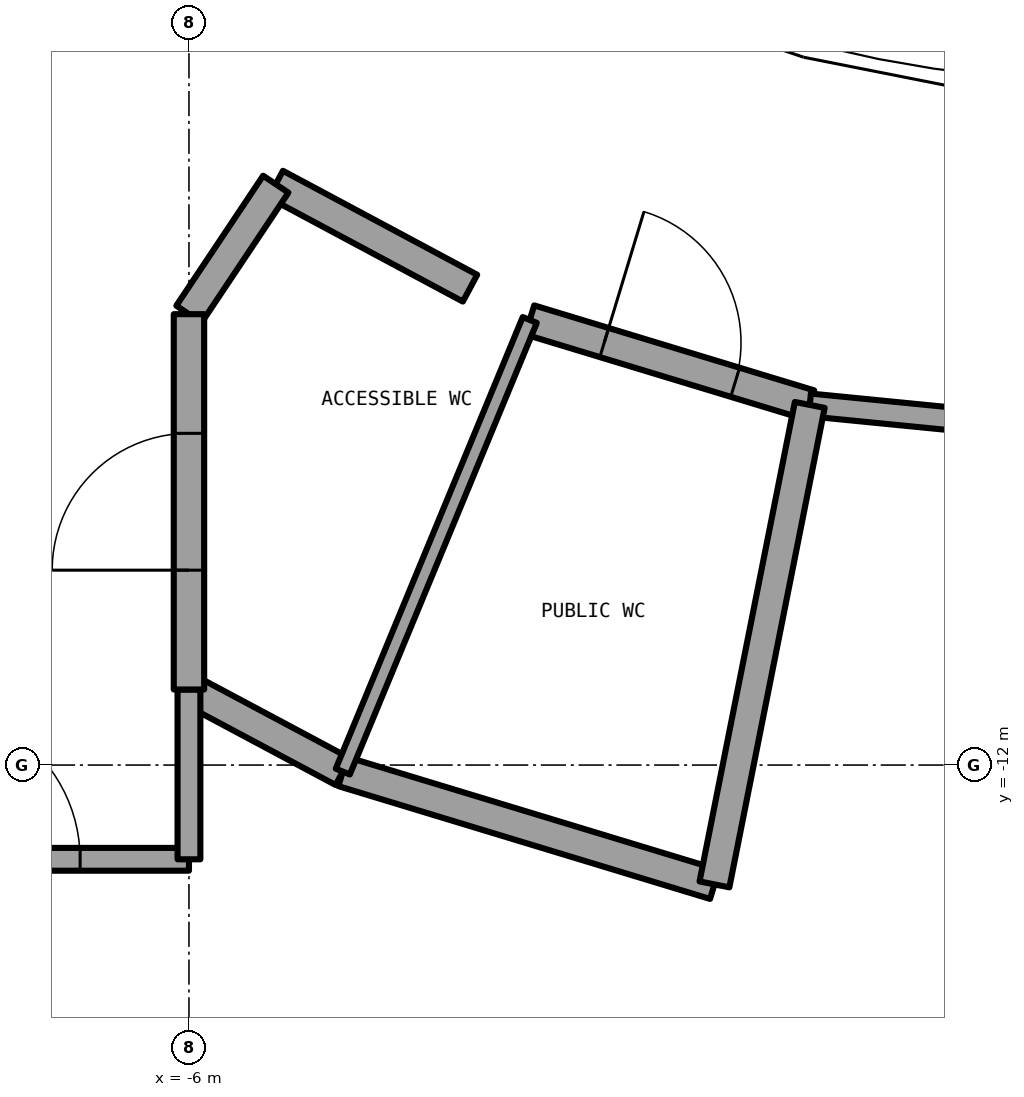
"""IFC4 building model, lengths in metres.
Left out: names, types, materials, properties, quantities, classifications, styles, units other than length and angle.
Written with IfcOpenShell. Run it as: python <this file> out.ifc"""

import sys

from ifc_helpers import new_model, si_unit, direction, frame, frame_2d, origin, place, context, subcontext, project, spatial, rectangle, extrude, element, fill, save


model = new_model("IFC4")
c1 = context("Model", 3, precision=1e-05, world=origin(), true_north=direction((0.0, 1.0)))
c2 = subcontext(c1, "Body", "Model", "MODEL_VIEW")
j1 = project(units=[si_unit("LENGTHUNIT", "METRE"), si_unit("PLANEANGLEUNIT", "RADIAN")], contexts=[c1])
p1 = place(None, origin())
s1 = spatial("IfcSite", under=j1, at=p1, CompositionType="ELEMENT")
p2 = place(p1, origin())
s2 = spatial("IfcBuilding", under=s1, at=p2, CompositionType="ELEMENT")
p3 = place(p2, frame((0.0, 0.0, 139.1)))
s3 = spatial("IfcBuildingStorey", under=s2, at=p3, CompositionType="ELEMENT", Elevation=139.1)
p4 = place(p3, frame((-6.0, -11.503, 0.0), z_axis=(0.0, 0.0, 1.0), x_axis=(0.882235076446, -0.470809165042, 0.0)))
e1 = element("IfcWall", 1, at=p4, inside=s3, PredefinedType="PARTITIONING", context=c2, shape_type="SweptSolid", body=[
    extrude(rectangle(XDim=1.147, YDim=0.2, at=frame_2d((0.573, 0.0))), origin(), (0.0, 0.0, 1.0), 5.75),
])
p5 = place(p3, frame((-4.988, -12.043, 0.0), z_axis=(0.0, 0.0, 1.0), x_axis=(0.956914242202, -0.290370682182, 0.0)))
e2 = element("IfcWall", 2, at=p5, inside=s3, PredefinedType="PARTITIONING", context=c2, shape_type="SweptSolid", body=[
    extrude(rectangle(XDim=2.555, YDim=0.2, at=frame_2d((1.278, 0.0))), origin(), (0.0, 0.0, 1.0), 5.75),
])
p6 = place(p3, frame((-8.432, -12.62, 0.0), z_axis=(0.0, 0.0, 1.0), x_axis=(1.0, 0.0, 0.0)))
e3 = element("IfcWall", 3, at=p6, inside=s3, PredefinedType="PARTITIONING", context=c2, shape_type="SweptSolid", body=[
    extrude(rectangle(XDim=2.432, YDim=0.15, at=frame_2d((1.216, 0.0))), origin(), (0.0, 0.0, 1.0), 5.75),
])
p7 = place(p6, frame((0.716, 0.0, 0.0)))
e4 = element("IfcOpeningElement", 4, at=p7, cuts=e3, PredefinedType="OPENING", context=c2, shape_type="SweptSolid", body=[
    extrude(rectangle(XDim=1.0, YDim=2.3, at=frame_2d((0.5, 1.15))), frame((0.0, 0.085, 0.0), z_axis=(0.0, -1.0, 0.0), x_axis=(1.0, 0.0, 0.0)), (0.0, 0.0, 1.0), 0.17),
])
p8 = place(p3, frame((-5.429, -8.179, 0.0), z_axis=(0.0, 0.0, 1.0), x_axis=(0.881652665802, -0.471898905364, 0.0)))
e5 = element("IfcWall", 5, at=p8, inside=s3, PredefinedType="PARTITIONING", context=c2, shape_type="SweptSolid", body=[
    extrude(rectangle(XDim=1.45, YDim=0.2, at=frame_2d((0.725, 0.0))), origin(), (0.0, 0.0, 1.0), 5.75),
])
p9 = place(p3, frame((-3.758, -9.072, 0.0), z_axis=(0.0, 0.0, 1.0), x_axis=(0.956896312675, -0.29042976223, 0.0)))
e6 = element("IfcWall", 6, at=p9, inside=s3, PredefinedType="PARTITIONING", context=c2, shape_type="SweptSolid", body=[
    extrude(rectangle(XDim=1.925, YDim=0.2, at=frame_2d((0.962, 0.0))), origin(), (0.0, 0.0, 1.0), 5.75),
])
p10 = place(p9, frame((0.512, 0.0, 0.0)))
e7 = element("IfcOpeningElement", 7, at=p10, cuts=e6, PredefinedType="OPENING", context=c2, shape_type="SweptSolid", body=[
    extrude(rectangle(XDim=0.9, YDim=2.3, at=frame_2d((0.45, 1.15))), frame((0.0, 0.11, 0.0), z_axis=(0.0, -1.0, 0.0), x_axis=(1.0, 0.0, 0.0)), (0.0, 0.0, 1.0), 0.22),
])
p11 = place(p3, frame((-1.916, -9.631, 0.0), z_axis=(0.0, 0.0, 1.0), x_axis=(0.995171860647, -0.098147683504, 0.0)))
e8 = element("IfcWall", 8, at=p11, inside=s3, PredefinedType="PARTITIONING", context=c2, shape_type="SweptSolid", body=[
    extrude(rectangle(XDim=1.925, YDim=0.15, at=frame_2d((0.963, 0.0))), origin(), (0.0, 0.0, 1.0), 5.75),
])
p12 = place(p3, frame((-6.0, -9.034, 0.0), z_axis=(0.0, 0.0, 1.0), x_axis=(0.555412364489, 0.831575075007, 0.0)))
e9 = element("IfcWall", 9, at=p12, inside=s3, PredefinedType="PARTITIONING", context=c2, shape_type="SweptSolid", body=[
    extrude(rectangle(XDim=1.028, YDim=0.2, at=frame_2d((0.514, 0.0))), origin(), (0.0, 0.0, 1.0), 5.75),
])
p13 = place(p3, frame((-4.988, -12.043, 0.0), z_axis=(0.0, 0.0, 1.0), x_axis=(0.382517205945, 0.923948368231, 0.0)))
e10 = element("IfcWall", 10, at=p13, inside=s3, PredefinedType="PARTITIONING", context=c2, shape_type="SweptSolid", body=[
    extrude(rectangle(XDim=3.216, YDim=0.1, at=frame_2d((1.608, 0.0))), origin(), (0.0, 0.0, 1.0), 5.75),
])
p14 = place(p3, frame((-2.543, -12.785, 0.0), z_axis=(0.0, 0.0, 1.0), x_axis=(0.194977117829, 0.980807791325, 0.0)))
e11 = element("IfcWall", 11, at=p14, inside=s3, PredefinedType="PARTITIONING", context=c2, shape_type="SweptSolid", body=[
    extrude(rectangle(XDim=3.216, YDim=0.2, at=frame_2d((1.608, 0.0))), origin(), (0.0, 0.0, 1.0), 5.75),
])
p15 = place(p3, frame((-6.0, -12.62, 0.0), z_axis=(0.0, 0.0, 1.0), x_axis=(0.0, 1.0, 0.0)))
e12 = element("IfcWall", 12, at=p15, inside=s3, PredefinedType="PARTITIONING", context=c2, shape_type="SweptSolid", body=[
    extrude(rectangle(XDim=1.117, YDim=0.15, at=frame_2d((0.559, 0.0))), origin(), (0.0, 0.0, 1.0), 5.75),
])
p16 = place(p3, frame((-6.0, -11.503, 0.0), z_axis=(0.0, 0.0, 1.0), x_axis=(0.0, 1.0, 0.0)))
e13 = element("IfcWall", 13, at=p16, inside=s3, PredefinedType="PARTITIONING", context=c2, shape_type="SweptSolid", body=[
    extrude(rectangle(XDim=2.469, YDim=0.2, at=frame_2d((1.234, 0.0))), origin(), (0.0, 0.0, 1.0), 5.75),
])
p17 = place(p16, frame((0.785, 0.0, 0.0)))
e14 = element("IfcOpeningElement", 14, at=p17, cuts=e13, PredefinedType="OPENING", context=c2, shape_type="SweptSolid", body=[
    extrude(rectangle(XDim=0.9, YDim=2.3, at=frame_2d((0.45, 1.15))), frame((0.0, 0.11, 0.0), z_axis=(0.0, -1.0, 0.0), x_axis=(1.0, 0.0, 0.0)), (0.0, 0.0, 1.0), 0.22),
])
p18 = place(p17, origin())
e15 = element("IfcDoor", 15, at=p18, inside=s3, OperationType="SINGLE_SWING_RIGHT", PredefinedType="DOOR", context=c2, shape_type="SweptSolid", body=[
    extrude(rectangle(XDim=0.9, YDim=2.3, at=frame_2d((0.45, 1.15))), frame((0.0, 0.025, 0.0), z_axis=(0.0, -1.0, 0.0), x_axis=(1.0, 0.0, 0.0)), (0.0, 0.0, 1.0), 0.05),
])
fill(e14, e15)
p19 = place(p10, origin())
e16 = element("IfcDoor", 16, at=p19, inside=s3, OperationType="SINGLE_SWING_RIGHT", PredefinedType="DOOR", context=c2, shape_type="SweptSolid", body=[
    extrude(rectangle(XDim=0.9, YDim=2.3, at=frame_2d((0.45, 1.15))), frame((0.0, 0.025, 0.0), z_axis=(0.0, -1.0, 0.0), x_axis=(1.0, 0.0, 0.0)), (0.0, 0.0, 1.0), 0.05),
])
fill(e7, e16)
p20 = place(p7, origin())
e17 = element("IfcDoor", 17, at=p20, inside=s3, OperationType="SINGLE_SWING_LEFT", PredefinedType="DOOR", context=c2, shape_type="SweptSolid", body=[
    extrude(rectangle(XDim=1.0, YDim=2.3, at=frame_2d((0.5, 1.15))), frame((0.0, 0.025, 0.0), z_axis=(0.0, -1.0, 0.0), x_axis=(1.0, 0.0, 0.0)), (0.0, 0.0, 1.0), 0.05),
])
fill(e4, e17)
save(model, sys.argv[1])
